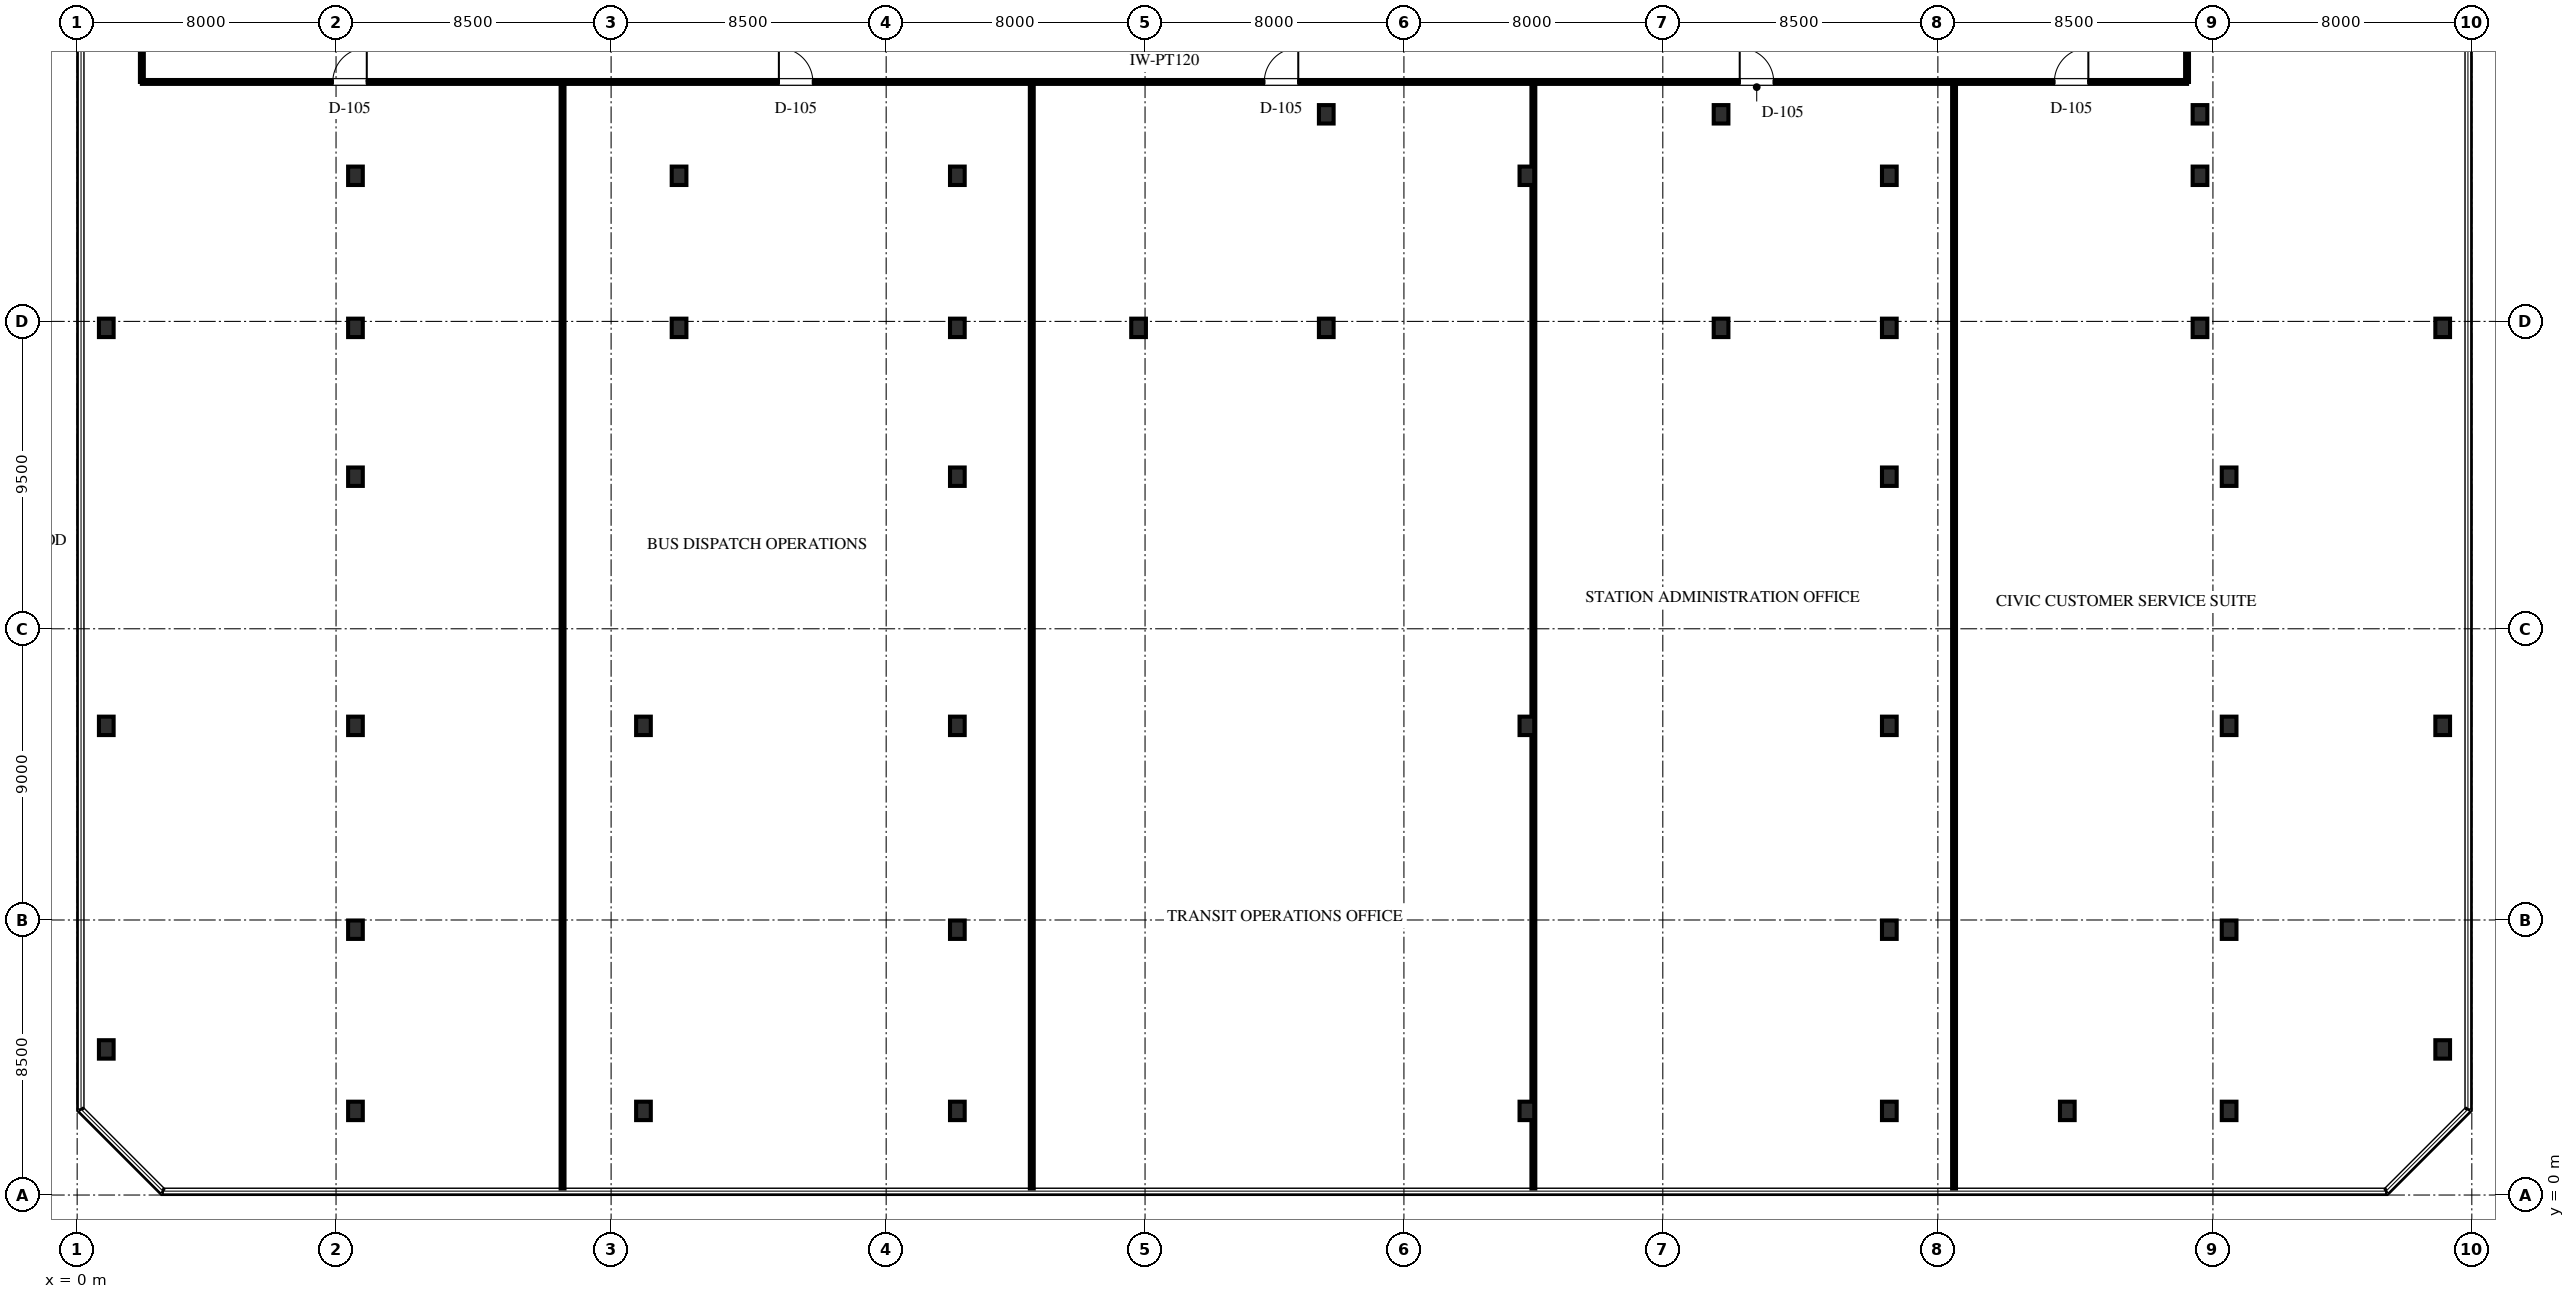
"""IFC4 building model, lengths in metres.
Left out: names, types, materials, properties, quantities, classifications, styles, units other than length and angle.
Written with IfcOpenShell. Run it as: python <this file> out.ifc"""

import sys

from ifc_helpers import new_model, si_unit, direction, frame, frame_2d, origin, origin_2d, place, context, subcontext, project, spatial, rectangle, i_section, extrude, element, fill, save


model = new_model("IFC4")
c1 = context("Model", 3, precision=1e-05, world=origin(), true_north=direction((0.0, 1.0)))
c2 = subcontext(c1, "Body", "Model", "MODEL_VIEW")
j1 = project(units=[si_unit("LENGTHUNIT", "METRE"), si_unit("PLANEANGLEUNIT", "RADIAN")], contexts=[c1])
p1 = place(None, origin())
s1 = spatial("IfcSite", under=j1, at=p1, CompositionType="ELEMENT")
p2 = place(p1, origin())
s2 = spatial("IfcBuilding", under=s1, at=p2, CompositionType="ELEMENT")
p3 = place(p2, frame((0.0, 0.0, 10.8)))
s3 = spatial("IfcBuildingStorey", under=s2, at=p3, CompositionType="ELEMENT", Elevation=10.8)
for number, where, z_axis, x_axis in (
    (1, (8.6, 2.6, 0.0), (0.0, 0.0, 1.0), (1.0, 0.0, 0.0)),
    (2, (17.5, 2.6, 0.0), (0.0, 0.0, 1.0), (1.0, 0.0, 0.0)),
    (3, (27.2, 2.6, 0.0), (0.0, 0.0, 1.0), (1.0, 0.0, 0.0)),
    (4, (44.8, 2.6, 0.0), (0.0, 0.0, 1.0), (1.0, 0.0, 0.0)),
    (5, (56.0, 2.6, 0.0), (0.0, 0.0, 1.0), (1.0, 0.0, 0.0)),
    (6, (61.5, 2.6, 0.0), (0.0, 0.0, 1.0), (1.0, 0.0, 0.0)),
    (7, (66.5, 2.6, 0.0), (0.0, 0.0, 1.0), (1.0, 0.0, 0.0)),
    (8, (8.6, 8.2, 0.0), (0.0, 0.0, 1.0), (1.0, 0.0, 0.0)),
    (9, (27.2, 8.2, 0.0), (0.0, 0.0, 1.0), (1.0, 0.0, 0.0)),
    (10, (56.0, 8.2, 0.0), (0.0, 0.0, 1.0), (1.0, 0.0, 0.0)),
    (11, (66.5, 8.2, 0.0), (0.0, 0.0, 1.0), (1.0, 0.0, 0.0)),
    (12, (8.6, 14.5, 0.0), (0.0, 0.0, 1.0), (1.0, 0.0, 0.0)),
    (13, (17.5, 14.5, 0.0), (0.0, 0.0, 1.0), (1.0, 0.0, 0.0)),
    (14, (27.2, 14.5, 0.0), (0.0, 0.0, 1.0), (1.0, 0.0, 0.0)),
    (15, (44.8, 14.5, 0.0), (0.0, 0.0, 1.0), (1.0, 0.0, 0.0)),
    (16, (56.0, 14.5, 0.0), (0.0, 0.0, 1.0), (1.0, 0.0, 0.0)),
    (17, (66.5, 14.5, 0.0), (0.0, 0.0, 1.0), (1.0, 0.0, 0.0)),
    (18, (8.6, 22.2, 0.0), (0.0, 0.0, 1.0), (1.0, 0.0, 0.0)),
    (19, (27.2, 22.2, 0.0), (0.0, 0.0, 1.0), (1.0, 0.0, 0.0)),
    (20, (56.0, 22.2, 0.0), (0.0, 0.0, 1.0), (1.0, 0.0, 0.0)),
    (21, (66.5, 22.2, 0.0), (0.0, 0.0, 1.0), (1.0, 0.0, 0.0)),
    (22, (8.6, 26.8, 0.0), (0.0, 0.0, 1.0), (1.0, 0.0, 0.0)),
    (23, (18.6, 26.8, 0.0), (0.0, 0.0, 1.0), (1.0, 0.0, 0.0)),
    (24, (27.2, 26.8, 0.0), (0.0, 0.0, 1.0), (1.0, 0.0, 0.0)),
    (25, (32.8, 26.8, 0.0), (0.0, 0.0, 1.0), (1.0, 0.0, 0.0)),
    (26, (38.6, 26.8, 0.0), (0.0, 0.0, 1.0), (1.0, 0.0, 0.0)),
    (27, (50.8, 26.8, 0.0), (0.0, 0.0, 1.0), (1.0, 0.0, 0.0)),
    (28, (56.0, 26.8, 0.0), (0.0, 0.0, 1.0), (1.0, 0.0, 0.0)),
    (29, (65.6, 26.8, 0.0), (0.0, 0.0, 1.0), (1.0, 0.0, 0.0)),
    (30, (8.6, 31.5, 0.0), (0.0, 0.0, 1.0), (1.0, 0.0, 0.0)),
    (31, (18.6, 31.5, 0.0), (0.0, 0.0, 1.0), (1.0, 0.0, 0.0)),
    (32, (27.2, 31.5, 0.0), (0.0, 0.0, 1.0), (1.0, 0.0, 0.0)),
    (33, (44.8, 31.5, 0.0), (0.0, 0.0, 1.0), (1.0, 0.0, 0.0)),
    (34, (56.0, 31.5, 0.0), (0.0, 0.0, 1.0), (1.0, 0.0, 0.0)),
    (35, (65.6, 31.5, 0.0), (0.0, 0.0, 1.0), (1.0, 0.0, 0.0)),
    (36, (0.9, 4.5, 0.0), (0.0, 0.0, 1.0), (1.0, 0.0, 0.0)),
    (37, (0.9, 14.5, 0.0), (0.0, 0.0, 1.0), (1.0, 0.0, 0.0)),
    (38, (0.9, 26.8, 0.0), (0.0, 0.0, 1.0), (1.0, 0.0, 0.0)),
    (39, (73.1, 4.5, 0.0), (0.0, 0.0, 1.0), (1.0, 0.0, 0.0)),
    (40, (73.1, 14.5, 0.0), (0.0, 0.0, 1.0), (1.0, 0.0, 0.0)),
    (41, (73.1, 26.8, 0.0), (0.0, 0.0, 1.0), (1.0, 0.0, 0.0)),
    (42, (38.6, 33.4, 0.0), (0.0, 0.0, 1.0), (1.0, 0.0, 0.0)),
    (43, (50.8, 33.4, 0.0), (0.0, 0.0, 1.0), (1.0, 0.0, 0.0)),
    (44, (65.6, 33.4, 0.0), (0.0, 0.0, 1.0), (1.0, 0.0, 0.0)),
):
    element("IfcColumn", number, at=place(p3, frame(where, z_axis=z_axis, x_axis=x_axis)), inside=s3, PredefinedType="COLUMN", context=c2, shape_type="SweptSolid", body=[
        extrude(i_section(OverallWidth=0.454, OverallDepth=0.569, WebThickness=0.078, FlangeThickness=0.125, FilletRadius=0.03, at=origin_2d()), origin(), (0.0, 0.0, 1.0), 4.5),
    ])
p4 = place(p3, frame((2.0, 34.4, 0.0), z_axis=(0.0, 0.0, 1.0), x_axis=(1.0, 0.0, 0.0)))
e45 = element("IfcWall", 45, at=p4, inside=s3, PredefinedType="PARTITIONING", context=c2, shape_type="SweptSolid", body=[
    extrude(rectangle(XDim=63.2, YDim=0.12, at=frame_2d((31.6, 0.0))), origin(), (0.0, 0.0, 1.0), 3.282),
])
p5 = place(p4, frame((5.9, 0.0, 0.0)))
e46 = element("IfcOpeningElement", 46, at=p5, cuts=e45, PredefinedType="OPENING", context=c2, shape_type="SweptSolid", body=[
    extrude(rectangle(XDim=1.05, YDim=2.2, at=frame_2d((0.525, 1.1))), frame((0.0, 0.07, 0.0), z_axis=(0.0, -1.0, 0.0), x_axis=(1.0, 0.0, 0.0)), (0.0, 0.0, 1.0), 0.14),
])
p6 = place(p4, frame((19.685, 0.0, 0.0)))
e47 = element("IfcOpeningElement", 47, at=p6, cuts=e45, PredefinedType="OPENING", context=c2, shape_type="SweptSolid", body=[
    extrude(rectangle(XDim=1.05, YDim=2.2, at=frame_2d((0.525, 1.1))), frame((0.0, 0.07, 0.0), z_axis=(0.0, -1.0, 0.0), x_axis=(1.0, 0.0, 0.0)), (0.0, 0.0, 1.0), 0.14),
])
p7 = place(p4, frame((34.685, 0.0, 0.0)))
e48 = element("IfcOpeningElement", 48, at=p7, cuts=e45, PredefinedType="OPENING", context=c2, shape_type="SweptSolid", body=[
    extrude(rectangle(XDim=1.05, YDim=2.2, at=frame_2d((0.525, 1.1))), frame((0.0, 0.07, 0.0), z_axis=(0.0, -1.0, 0.0), x_axis=(1.0, 0.0, 0.0)), (0.0, 0.0, 1.0), 0.14),
])
p8 = place(p4, frame((49.377, 0.0, 0.0)))
e49 = element("IfcOpeningElement", 49, at=p8, cuts=e45, PredefinedType="OPENING", context=c2, shape_type="SweptSolid", body=[
    extrude(rectangle(XDim=1.05, YDim=2.2, at=frame_2d((0.525, 1.1))), frame((0.0, 0.07, 0.0), z_axis=(0.0, -1.0, 0.0), x_axis=(1.0, 0.0, 0.0)), (0.0, 0.0, 1.0), 0.14),
])
p9 = place(p4, frame((59.1, 0.0, 0.0)))
e50 = element("IfcOpeningElement", 50, at=p9, cuts=e45, PredefinedType="OPENING", context=c2, shape_type="SweptSolid", body=[
    extrude(rectangle(XDim=1.05, YDim=2.2, at=frame_2d((0.525, 1.1))), frame((0.0, 0.07, 0.0), z_axis=(0.0, -1.0, 0.0), x_axis=(1.0, 0.0, 0.0)), (0.0, 0.0, 1.0), 0.14),
])
p10 = place(p3, frame((2.0, 34.4, 0.0), z_axis=(0.0, 0.0, 1.0), x_axis=(0.0, 1.0, 0.0)))
e51 = element("IfcWall", 51, at=p10, inside=s3, PredefinedType="PARTITIONING", context=c2, shape_type="SweptSolid", body=[
    extrude(rectangle(XDim=3.65, YDim=0.12, at=frame_2d((1.825, 0.0))), origin(), (0.0, 0.0, 1.0), 3.282),
])
p11 = place(p3, frame((65.2, 34.4, 0.0), z_axis=(0.0, 0.0, 1.0), x_axis=(0.0, 1.0, 0.0)))
e52 = element("IfcWall", 52, at=p11, inside=s3, PredefinedType="PARTITIONING", context=c2, shape_type="SweptSolid", body=[
    extrude(rectangle(XDim=3.167, YDim=0.12, at=frame_2d((1.583, 0.0))), origin(), (0.0, 0.0, 1.0), 3.282),
])
for number, where, z_axis, x_axis in (
    (53, (15.0, 0.2, 0.0), (0.0, 0.0, 1.0), (0.0, 1.0, 0.0)),
    (54, (29.5, 0.2, 0.0), (0.0, 0.0, 1.0), (0.0, 1.0, 0.0)),
    (55, (45.0, 0.2, 0.0), (0.0, 0.0, 1.0), (0.0, 1.0, 0.0)),
    (56, (58.0, 0.2, 0.0), (0.0, 0.0, 1.0), (0.0, 1.0, 0.0)),
):
    element("IfcWall", number, at=place(p3, frame(where, z_axis=z_axis, x_axis=x_axis)), inside=s3, PredefinedType="PARTITIONING", context=c2, shape_type="SweptSolid", body=[
        extrude(rectangle(XDim=34.132, YDim=0.12, at=frame_2d((17.066, 0.0))), origin(), (0.0, 0.0, 1.0), 3.282),
    ])
p12 = place(p5, origin())
e57 = element("IfcDoor", 57, at=p12, inside=s3, OperationType="SINGLE_SWING_RIGHT", PredefinedType="DOOR", context=c2, shape_type="SweptSolid", body=[
    extrude(rectangle(XDim=1.05, YDim=2.2, at=frame_2d((0.525, 1.1))), frame((0.0, 0.025, 0.0), z_axis=(0.0, -1.0, 0.0), x_axis=(1.0, 0.0, 0.0)), (0.0, 0.0, 1.0), 0.05),
])
fill(e46, e57)
p13 = place(p6, origin())
e58 = element("IfcDoor", 58, at=p13, inside=s3, OperationType="SINGLE_SWING_LEFT", PredefinedType="DOOR", context=c2, shape_type="SweptSolid", body=[
    extrude(rectangle(XDim=1.05, YDim=2.2, at=frame_2d((0.525, 1.1))), frame((0.0, 0.025, 0.0), z_axis=(0.0, -1.0, 0.0), x_axis=(1.0, 0.0, 0.0)), (0.0, 0.0, 1.0), 0.05),
])
fill(e47, e58)
p14 = place(p7, origin())
e59 = element("IfcDoor", 59, at=p14, inside=s3, OperationType="SINGLE_SWING_RIGHT", PredefinedType="DOOR", context=c2, shape_type="SweptSolid", body=[
    extrude(rectangle(XDim=1.05, YDim=2.2, at=frame_2d((0.525, 1.1))), frame((0.0, 0.025, 0.0), z_axis=(0.0, -1.0, 0.0), x_axis=(1.0, 0.0, 0.0)), (0.0, 0.0, 1.0), 0.05),
])
fill(e48, e59)
p15 = place(p8, origin())
e60 = element("IfcDoor", 60, at=p15, inside=s3, OperationType="SINGLE_SWING_LEFT", PredefinedType="DOOR", context=c2, shape_type="SweptSolid", body=[
    extrude(rectangle(XDim=1.05, YDim=2.2, at=frame_2d((0.525, 1.1))), frame((0.0, 0.025, 0.0), z_axis=(0.0, -1.0, 0.0), x_axis=(1.0, 0.0, 0.0)), (0.0, 0.0, 1.0), 0.05),
])
fill(e49, e60)
p16 = place(p9, origin())
e61 = element("IfcDoor", 61, at=p16, inside=s3, OperationType="SINGLE_SWING_RIGHT", PredefinedType="DOOR", context=c2, shape_type="SweptSolid", body=[
    extrude(rectangle(XDim=1.05, YDim=2.2, at=frame_2d((0.525, 1.1))), frame((0.0, 0.025, 0.0), z_axis=(0.0, -1.0, 0.0), x_axis=(1.0, 0.0, 0.0)), (0.0, 0.0, 1.0), 0.05),
])
fill(e50, e61)
save(model, sys.argv[1])
